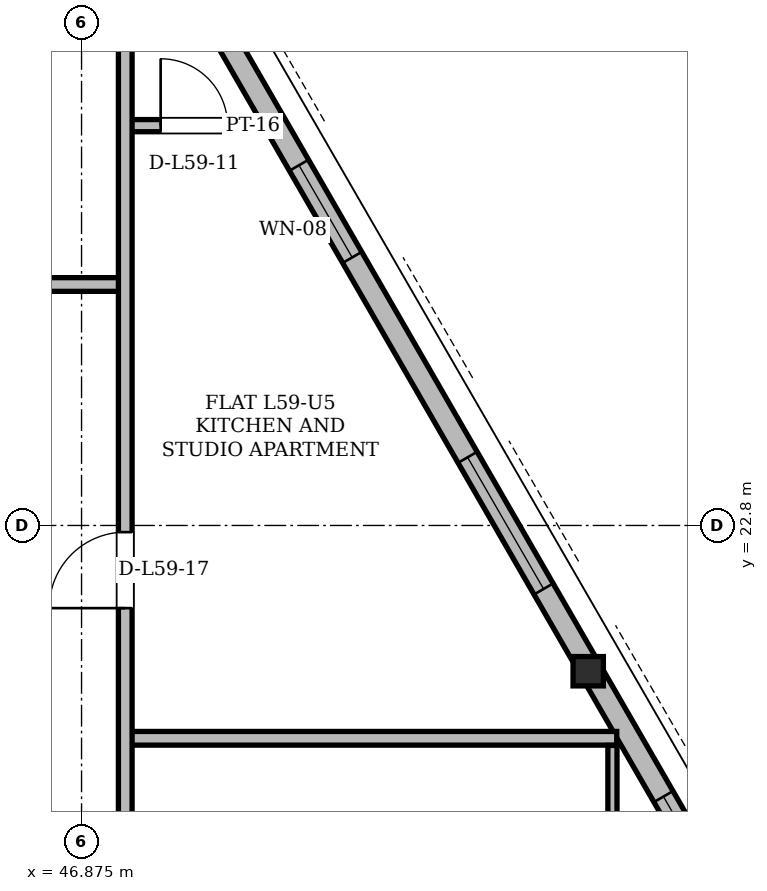
"""IFC4 building model, lengths in metres.
Left out: names, types, materials, properties, quantities, classifications, styles, units other than length and angle.
Written with IfcOpenShell. Run it as: python <this file> out.ifc"""

import sys

from ifc_helpers import new_model, si_unit, direction, frame, frame_2d, origin, origin_2d, place, context, subcontext, project, spatial, rectangle, i_section, extrude, element, fill, save


model = new_model("IFC4")
c1 = context("Model", 3, precision=1e-05, world=origin(), true_north=direction((0.0, 1.0)))
c2 = subcontext(c1, "Body", "Model", "MODEL_VIEW")
j1 = project(units=[si_unit("LENGTHUNIT", "METRE"), si_unit("PLANEANGLEUNIT", "RADIAN")], contexts=[c1])
p1 = place(None, origin())
s1 = spatial("IfcSite", under=j1, at=p1, CompositionType="ELEMENT")
p2 = place(p1, origin())
s2 = spatial("IfcBuilding", under=s1, at=p2, CompositionType="ELEMENT")
p3 = place(p2, frame((0.0, 0.0, 223.5)))
s3 = spatial("IfcBuildingStorey", under=s2, at=p3, CompositionType="ELEMENT", Elevation=223.5)
p4 = place(p3, frame((53.567, 20.903, 0.004), z_axis=(-0.014274542745, -0.011691530248, 0.999829758284), x_axis=(0.633638927146, -0.773628922679, 0.0)))
e1 = element("IfcColumn", 1, at=p4, inside=s3, PredefinedType="COLUMN", context=c2, shape_type="SweptSolid", body=[
    extrude(i_section(OverallWidth=0.399, OverallDepth=0.386, WebThickness=0.021, FlangeThickness=0.033, at=origin_2d()), origin(), (0.0, 0.0, 1.0), 3.592),
])
p5 = place(p3, frame((59.07, 11.372, 0.0), z_axis=(0.0, 0.0, 1.0), x_axis=(-0.500000292553, 0.866025234879, 0.0)))
e2 = element("IfcWall", 2, at=p5, inside=s3, PredefinedType="SOLIDWALL", context=c2, shape_type="SweptSolid", body=[
    extrude(rectangle(XDim=36.688, YDim=0.29, at=frame_2d((18.344, 0.0))), origin(), (0.0, 0.0, 1.0), 2.677),
])
p6 = place(p5, frame((3.429, 0.0, 0.0)))
e3 = element("IfcOpeningElement", 3, at=p6, cuts=e2, PredefinedType="OPENING", context=c2, shape_type="SweptSolid", body=[
    extrude(rectangle(XDim=1.5, YDim=2.2, at=frame_2d((0.75, 1.1))), frame((0.0, 0.145, 0.0), z_axis=(0.0, -1.0, 0.0), x_axis=(1.0, 0.0, 0.0)), (0.0, 0.0, 1.0), 0.29),
])
p7 = place(p5, frame((27.154, 0.0, 0.0)))
e4 = element("IfcOpeningElement", 4, at=p7, cuts=e2, PredefinedType="OPENING", context=c2, shape_type="SweptSolid", body=[
    extrude(rectangle(XDim=1.5, YDim=2.2, at=frame_2d((0.75, 1.1))), frame((0.0, 0.145, 0.0), z_axis=(0.0, -1.0, 0.0), x_axis=(1.0, 0.0, 0.0)), (0.0, 0.0, 1.0), 0.29),
])
p8 = place(p5, frame((7.878, 0.0, 0.85)))
e5 = element("IfcOpeningElement", 5, at=p8, cuts=e2, PredefinedType="OPENING", context=c2, shape_type="SweptSolid", body=[
    extrude(rectangle(XDim=1.2, YDim=1.48, at=frame_2d((0.6, 0.74))), frame((0.0, 0.145, 0.0), z_axis=(0.0, -1.0, 0.0), x_axis=(1.0, 0.0, 0.0)), (0.0, 0.0, 1.0), 0.29),
])
p9 = place(p5, frame((1.266, 0.0, 0.85)))
e6 = element("IfcOpeningElement", 6, at=p9, cuts=e2, PredefinedType="OPENING", context=c2, shape_type="SweptSolid", body=[
    extrude(rectangle(XDim=1.2, YDim=1.48, at=frame_2d((0.6, 0.74))), frame((0.0, 0.145, 0.0), z_axis=(0.0, -1.0, 0.0), x_axis=(1.0, 0.0, 0.0)), (0.0, 0.0, 1.0), 0.29),
])
p10 = place(p5, frame((12.232, 0.0, 0.85)))
e7 = element("IfcOpeningElement", 7, at=p10, cuts=e2, PredefinedType="OPENING", context=c2, shape_type="SweptSolid", body=[
    extrude(rectangle(XDim=2.0, YDim=1.717, at=frame_2d((1.0, 0.858))), frame((0.0, 0.145, 0.0), z_axis=(0.0, -1.0, 0.0), x_axis=(1.0, 0.0, 0.0)), (0.0, 0.0, 1.0), 0.29),
])
p11 = place(p5, frame((17.268, 0.0, 0.85)))
e8 = element("IfcOpeningElement", 8, at=p11, cuts=e2, PredefinedType="OPENING", context=c2, shape_type="SweptSolid", body=[
    extrude(rectangle(XDim=1.4, YDim=1.6, at=frame_2d((0.7, 0.8))), frame((0.0, 0.145, 0.0), z_axis=(0.0, -1.0, 0.0), x_axis=(1.0, 0.0, 0.0)), (0.0, 0.0, 1.0), 0.29),
])
p12 = place(p5, frame((20.594, 0.0, 0.85)))
e9 = element("IfcOpeningElement", 9, at=p12, cuts=e2, PredefinedType="OPENING", context=c2, shape_type="SweptSolid", body=[
    extrude(rectangle(XDim=1.2, YDim=1.48, at=frame_2d((0.6, 0.74))), frame((0.0, 0.145, 0.0), z_axis=(0.0, -1.0, 0.0), x_axis=(1.0, 0.0, 0.0)), (0.0, 0.0, 1.0), 0.29),
])
p13 = place(p5, frame((34.312, 0.0, 0.85)))
e10 = element("IfcOpeningElement", 10, at=p13, cuts=e2, PredefinedType="OPENING", context=c2, shape_type="SweptSolid", body=[
    extrude(rectangle(XDim=1.2, YDim=1.48, at=frame_2d((0.6, 0.74))), frame((0.0, 0.145, 0.0), z_axis=(0.0, -1.0, 0.0), x_axis=(1.0, 0.0, 0.0)), (0.0, 0.0, 1.0), 0.29),
])
p14 = place(p3, frame((47.45, 20.0, 0.0), z_axis=(0.0, 0.0, 1.0), x_axis=(1.0, 0.0, 0.0)))
e11 = element("IfcWall", 11, at=p14, inside=s3, PredefinedType="PARTITIONING", context=c2, shape_type="SweptSolid", body=[
    extrude(rectangle(XDim=6.467, YDim=0.18, at=frame_2d((3.233, 0.0))), origin(), (0.0, 0.0, 1.0), 3.38),
])
p15 = place(p3, frame((25.6, 25.97, 0.0), z_axis=(0.0, 0.0, 1.0), x_axis=(1.0, 0.0, 0.0)))
e12 = element("IfcWall", 12, at=p15, inside=s3, PredefinedType="PARTITIONING", context=c2, shape_type="SweptSolid", body=[
    extrude(rectangle(XDim=21.85, YDim=0.18, at=frame_2d((10.925, 0.0))), origin(), (0.0, 0.0, 1.0), 2.913),
])
p16 = place(p15, frame((5.347, 0.0, 0.0)))
e13 = element("IfcOpeningElement", 13, at=p16, cuts=e12, PredefinedType="OPENING", context=c2, shape_type="SweptSolid", body=[
    extrude(rectangle(XDim=1.0, YDim=2.18, at=frame_2d((0.5, 1.09))), frame((0.0, 0.09, 0.0), z_axis=(0.0, -1.0, 0.0), x_axis=(1.0, 0.0, 0.0)), (0.0, 0.0, 1.0), 0.18),
])
p17 = place(p15, frame((15.35, 0.0, 0.0)))
e14 = element("IfcOpeningElement", 14, at=p17, cuts=e12, PredefinedType="OPENING", context=c2, shape_type="SweptSolid", body=[
    extrude(rectangle(XDim=1.3, YDim=2.2, at=frame_2d((0.65, 1.1))), frame((0.0, 0.09, 0.0), z_axis=(0.0, -1.0, 0.0), x_axis=(1.0, 0.0, 0.0)), (0.0, 0.0, 1.0), 0.18),
])
p18 = place(p15, frame((18.94, 0.0, 0.0)))
e15 = element("IfcOpeningElement", 15, at=p18, cuts=e12, PredefinedType="OPENING", context=c2, shape_type="SweptSolid", body=[
    extrude(rectangle(XDim=1.0, YDim=2.18, at=frame_2d((0.5, 1.09))), frame((0.0, 0.09, 0.0), z_axis=(0.0, -1.0, 0.0), x_axis=(1.0, 0.0, 0.0)), (0.0, 0.0, 1.0), 0.18),
])
p19 = place(p3, frame((47.368, 28.06, 0.0), z_axis=(0.0, 0.0, 1.0), x_axis=(1.0, 0.0, 0.0)))
e16 = element("IfcWall", 16, at=p19, inside=s3, PredefinedType="PARTITIONING", context=c2, shape_type="SweptSolid", body=[
    extrude(rectangle(XDim=1.895, YDim=0.16, at=frame_2d((0.948, 0.0))), origin(), (0.0, 0.0, 1.0), 3.38),
])
p20 = place(p19, frame((0.548, 0.0, 0.0)))
e17 = element("IfcOpeningElement", 17, at=p20, cuts=e16, PredefinedType="OPENING", context=c2, shape_type="SweptSolid", body=[
    extrude(rectangle(XDim=0.88, YDim=2.08, at=frame_2d((0.44, 1.04))), frame((0.0, 0.08, 0.0), z_axis=(0.0, -1.0, 0.0), x_axis=(1.0, 0.0, 0.0)), (0.0, 0.0, 1.0), 0.16),
])
p21 = place(p3, frame((47.45, 5.933, 0.0), z_axis=(0.0, 0.0, 1.0), x_axis=(0.0, 1.0, 0.0)))
e18 = element("IfcWall", 18, at=p21, inside=s3, PredefinedType="PARTITIONING", context=c2, shape_type="SweptSolid", body=[
    extrude(rectangle(XDim=25.267, YDim=0.18, at=frame_2d((12.634, 0.0))), origin(), (0.0, 0.0, 1.0), 2.913),
])
p22 = place(p21, frame((8.989, 0.0, 0.0)))
e19 = element("IfcOpeningElement", 19, at=p22, cuts=e18, PredefinedType="OPENING", context=c2, shape_type="SweptSolid", body=[
    extrude(rectangle(XDim=1.0, YDim=2.18, at=frame_2d((0.5, 1.09))), frame((0.0, 0.09, 0.0), z_axis=(0.0, -1.0, 0.0), x_axis=(1.0, 0.0, 0.0)), (0.0, 0.0, 1.0), 0.18),
])
p23 = place(p21, frame((15.779, 0.0, 0.0)))
e20 = element("IfcOpeningElement", 20, at=p23, cuts=e18, PredefinedType="OPENING", context=c2, shape_type="SweptSolid", body=[
    extrude(rectangle(XDim=1.0, YDim=2.18, at=frame_2d((0.5, 1.09))), frame((0.0, 0.09, 0.0), z_axis=(0.0, -1.0, 0.0), x_axis=(1.0, 0.0, 0.0)), (0.0, 0.0, 1.0), 0.18),
])
p24 = place(p3, frame((53.86, 5.933, 0.0), z_axis=(0.0, 0.0, 1.0), x_axis=(0.0, 1.0, 0.0)))
e21 = element("IfcWall", 21, at=p24, inside=s3, PredefinedType="PARTITIONING", context=c2, shape_type="SweptSolid", body=[
    extrude(rectangle(XDim=13.973, YDim=0.12, at=frame_2d((6.986, 0.0))), origin(), (0.0, 0.0, 1.0), 2.913),
])
p25 = place(p24, frame((0.715, 0.0, 0.0)))
e22 = element("IfcOpeningElement", 22, at=p25, cuts=e21, PredefinedType="OPENING", context=c2, shape_type="SweptSolid", body=[
    extrude(rectangle(XDim=0.88, YDim=2.08, at=frame_2d((0.44, 1.04))), frame((0.0, 0.06, 0.0), z_axis=(0.0, -1.0, 0.0), x_axis=(1.0, 0.0, 0.0)), (0.0, 0.0, 1.0), 0.12),
])
p26 = place(p24, frame((3.04, 0.0, 0.0)))
e23 = element("IfcOpeningElement", 23, at=p26, cuts=e21, PredefinedType="OPENING", context=c2, shape_type="SweptSolid", body=[
    extrude(rectangle(XDim=0.95, YDim=2.1, at=frame_2d((0.475, 1.05))), frame((0.0, 0.06, 0.0), z_axis=(0.0, -1.0, 0.0), x_axis=(1.0, 0.0, 0.0)), (0.0, 0.0, 1.0), 0.12),
])
p27 = place(p24, frame((8.934, 0.0, 0.0)))
e24 = element("IfcOpeningElement", 24, at=p27, cuts=e21, PredefinedType="OPENING", context=c2, shape_type="SweptSolid", body=[
    extrude(rectangle(XDim=0.92, YDim=2.12, at=frame_2d((0.46, 1.06))), frame((0.0, 0.06, 0.0), z_axis=(0.0, -1.0, 0.0), x_axis=(1.0, 0.0, 0.0)), (0.0, 0.0, 1.0), 0.12),
])
p28 = place(p8, origin())
e25 = element("IfcWindow", 25, at=p28, inside=s3, PartitioningType="SINGLE_PANEL", PredefinedType="WINDOW", context=c2, shape_type="SweptSolid", body=[
    extrude(rectangle(XDim=1.2, YDim=1.48, at=frame_2d((0.6, 0.74))), frame((0.0, 0.03, 0.0), z_axis=(0.0, -1.0, 0.0), x_axis=(1.0, 0.0, 0.0)), (0.0, 0.0, 1.0), 0.06),
])
fill(e5, e25)
p29 = place(p10, origin())
e26 = element("IfcWindow", 26, at=p29, inside=s3, PartitioningType="SINGLE_PANEL", PredefinedType="WINDOW", context=c2, shape_type="SweptSolid", body=[
    extrude(rectangle(XDim=2.0, YDim=1.717, at=frame_2d((1.0, 0.858))), frame((0.0, 0.03, 0.0), z_axis=(0.0, -1.0, 0.0), x_axis=(1.0, 0.0, 0.0)), (0.0, 0.0, 1.0), 0.06),
])
fill(e7, e26)
p30 = place(p11, origin())
e27 = element("IfcWindow", 27, at=p30, inside=s3, PartitioningType="SINGLE_PANEL", PredefinedType="WINDOW", context=c2, shape_type="SweptSolid", body=[
    extrude(rectangle(XDim=1.4, YDim=1.6, at=frame_2d((0.7, 0.8))), frame((0.0, 0.03, 0.0), z_axis=(0.0, -1.0, 0.0), x_axis=(1.0, 0.0, 0.0)), (0.0, 0.0, 1.0), 0.06),
])
fill(e8, e27)
p31 = place(p20, origin())
e28 = element("IfcDoor", 28, at=p31, inside=s3, OperationType="SINGLE_SWING_LEFT", PredefinedType="DOOR", context=c2, shape_type="SweptSolid", body=[
    extrude(rectangle(XDim=0.88, YDim=2.08, at=frame_2d((0.44, 1.04))), frame((0.0, 0.025, 0.0), z_axis=(0.0, -1.0, 0.0), x_axis=(1.0, 0.0, 0.0)), (0.0, 0.0, 1.0), 0.05),
])
fill(e17, e28)
p32 = place(p23, origin())
e29 = element("IfcDoor", 29, at=p32, inside=s3, OperationType="SINGLE_SWING_LEFT", PredefinedType="DOOR", context=c2, shape_type="SweptSolid", body=[
    extrude(rectangle(XDim=1.0, YDim=2.18, at=frame_2d((0.5, 1.09))), frame((0.0, 0.025, 0.0), z_axis=(0.0, -1.0, 0.0), x_axis=(1.0, 0.0, 0.0)), (0.0, 0.0, 1.0), 0.05),
])
fill(e20, e29)
save(model, sys.argv[1])
